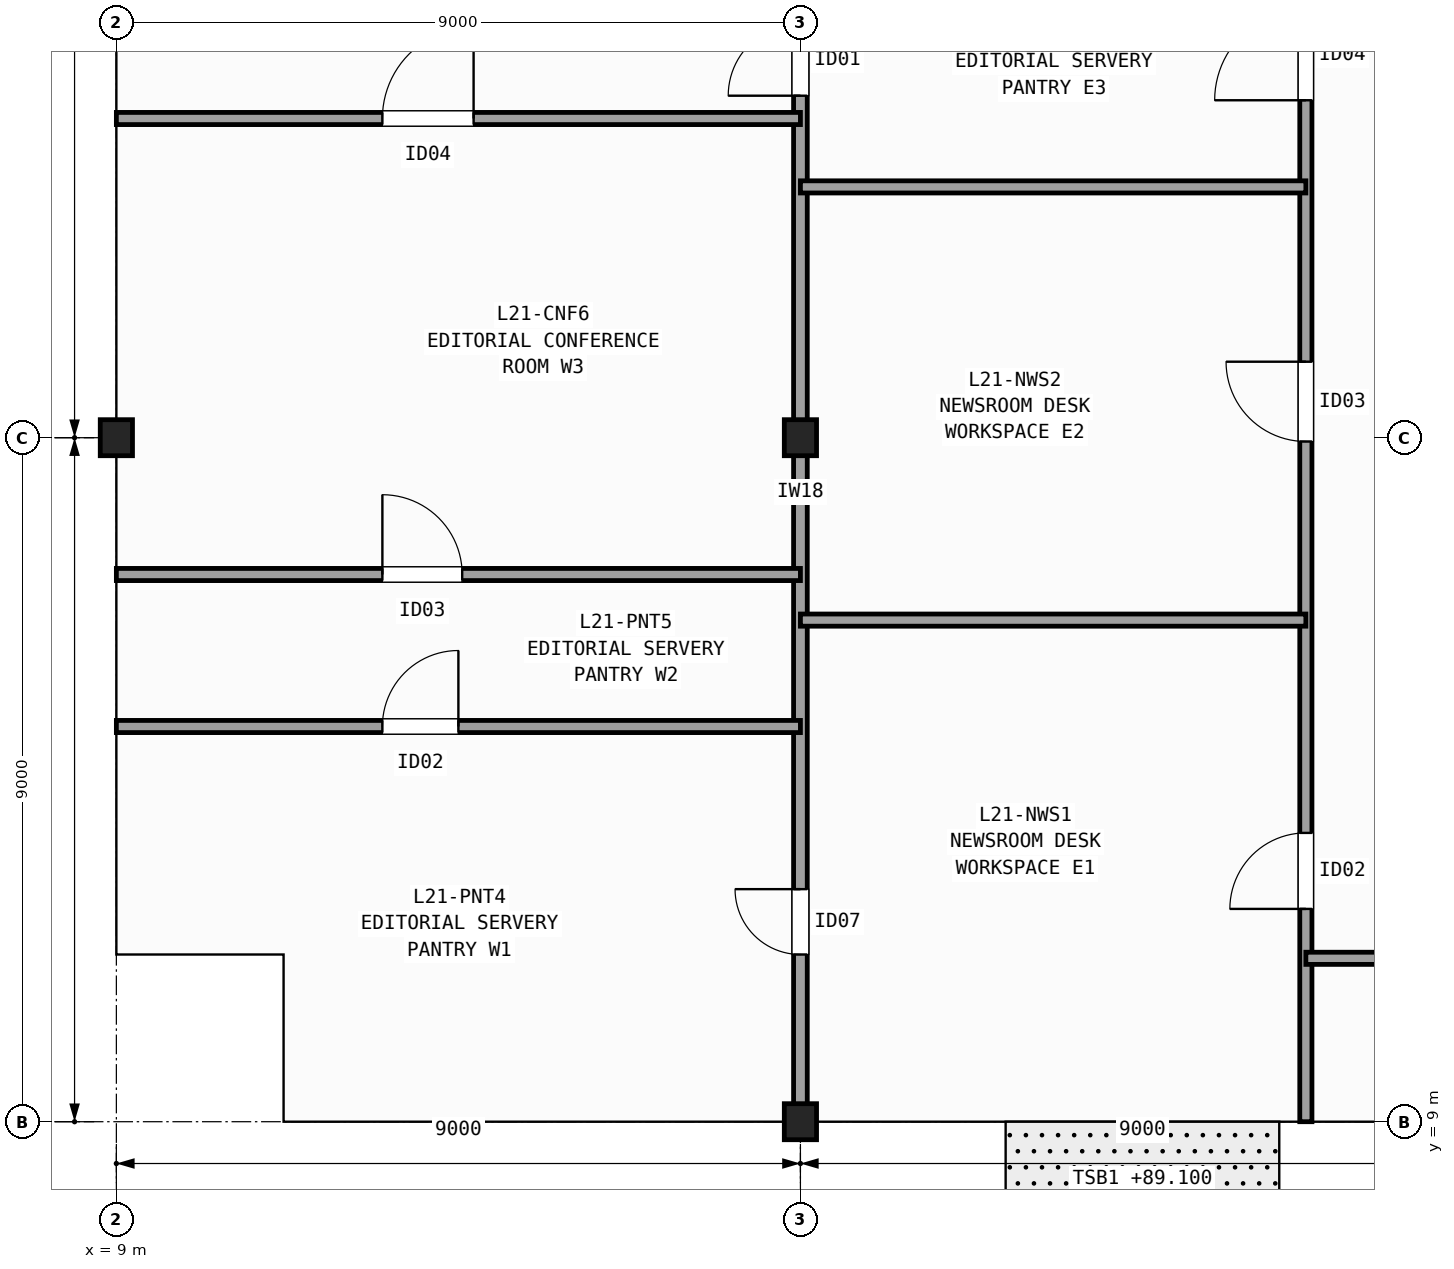
"""IFC4 building model, lengths in metres.
Left out: names, types, materials, properties, quantities, classifications, styles, units other than length and angle.
Written with IfcOpenShell. Run it as: python <this file> out.ifc"""

import sys

from ifc_helpers import new_model, si_unit, direction, frame, frame_2d, origin, origin_2d, place, context, subcontext, project, spatial, rectangle, i_section, extrude, element, fill, save


model = new_model("IFC4")
c1 = context("Model", 3, precision=1e-05, world=origin(), true_north=direction((0.0, 1.0)))
c2 = subcontext(c1, "Body", "Model", "MODEL_VIEW")
j1 = project(units=[si_unit("LENGTHUNIT", "METRE"), si_unit("PLANEANGLEUNIT", "RADIAN")], contexts=[c1])
p1 = place(None, origin())
s1 = spatial("IfcSite", under=j1, at=p1, CompositionType="ELEMENT")
p2 = place(p1, origin())
s2 = spatial("IfcBuilding", under=s1, at=p2, CompositionType="ELEMENT")
p3 = place(p2, frame((0.0, 0.0, 89.1)))
s3 = spatial("IfcBuildingStorey", under=s2, at=p3, CompositionType="ELEMENT", Elevation=89.1)
for number, where, z_axis, x_axis in (
    (1, (9.0, 18.0, 0.0), (0.0, 0.0, 1.0), (1.0, 0.0, 0.0)),
    (2, (18.0, 9.0, 0.0), (0.0, 0.0, 1.0), (1.0, 0.0, 0.0)),
    (3, (18.0, 18.0, 0.0), (0.0, 0.0, 1.0), (1.0, 0.0, 0.0)),
):
    element("IfcColumn", number, at=place(p3, frame(where, z_axis=z_axis, x_axis=x_axis)), inside=s3, PredefinedType="COLUMN", context=c2, shape_type="SweptSolid", body=[
        extrude(i_section(OverallWidth=0.424, OverallDepth=0.474, WebThickness=0.048, FlangeThickness=0.077, FilletRadius=0.015, at=origin_2d()), origin(), (0.0, 0.0, 1.0), 3.7),
    ])
p4 = place(p3, frame((24.65, 9.0, 0.0), z_axis=(0.0, 0.0, 1.0), x_axis=(0.0, 1.0, 0.0)))
e4 = element("IfcWall", 4, at=p4, inside=s3, PredefinedType="PARTITIONING", context=c2, shape_type="SweptSolid", body=[
    extrude(rectangle(XDim=19.2, YDim=0.16, at=frame_2d((9.6, 0.0))), origin(), (0.0, 0.0, 1.0), 2.627),
])
p5 = place(p4, frame((2.8, 0.0, 0.0)))
e5 = element("IfcOpeningElement", 5, at=p5, cuts=e4, PredefinedType="OPENING", context=c2, shape_type="SweptSolid", body=[
    extrude(rectangle(XDim=1.0, YDim=2.1, at=frame_2d((0.5, 1.05))), frame((0.0, 0.09, 0.0), z_axis=(0.0, -1.0, 0.0), x_axis=(1.0, 0.0, 0.0)), (0.0, 0.0, 1.0), 0.18),
])
p6 = place(p4, frame((8.95, 0.0, 0.0)))
e6 = element("IfcOpeningElement", 6, at=p6, cuts=e4, PredefinedType="OPENING", context=c2, shape_type="SweptSolid", body=[
    extrude(rectangle(XDim=1.05, YDim=2.15, at=frame_2d((0.525, 1.075))), frame((0.0, 0.09, 0.0), z_axis=(0.0, -1.0, 0.0), x_axis=(1.0, 0.0, 0.0)), (0.0, 0.0, 1.0), 0.18),
])
p7 = place(p4, frame((13.44, 0.0, 0.0)))
e7 = element("IfcOpeningElement", 7, at=p7, cuts=e4, PredefinedType="OPENING", context=c2, shape_type="SweptSolid", body=[
    extrude(rectangle(XDim=1.2, YDim=2.15, at=frame_2d((0.6, 1.075))), frame((0.0, 0.09, 0.0), z_axis=(0.0, -1.0, 0.0), x_axis=(1.0, 0.0, 0.0)), (0.0, 0.0, 1.0), 0.18),
])
p8 = place(p3, frame((18.0, 9.0, 0.0), z_axis=(0.0, 0.0, 1.0), x_axis=(0.0, 1.0, 0.0)))
e8 = element("IfcWall", 8, at=p8, inside=s3, PredefinedType="PARTITIONING", context=c2, shape_type="SweptSolid", body=[
    extrude(rectangle(XDim=15.58, YDim=0.18, at=frame_2d((7.79, 0.0))), origin(), (0.0, 0.0, 1.0), 2.627),
])
p9 = place(p8, frame((2.2, 0.0, 0.0)))
e9 = element("IfcOpeningElement", 9, at=p9, cuts=e8, PredefinedType="OPENING", context=c2, shape_type="SweptSolid", body=[
    extrude(rectangle(XDim=0.86, YDim=2.05, at=frame_2d((0.43, 1.025))), frame((0.0, 0.1, 0.0), z_axis=(0.0, -1.0, 0.0), x_axis=(1.0, 0.0, 0.0)), (0.0, 0.0, 1.0), 0.2),
])
p10 = place(p8, frame((13.5, 0.0, 0.0)))
e10 = element("IfcOpeningElement", 10, at=p10, cuts=e8, PredefinedType="OPENING", context=c2, shape_type="SweptSolid", body=[
    extrude(rectangle(XDim=0.95, YDim=2.1, at=frame_2d((0.475, 1.05))), frame((0.0, 0.1, 0.0), z_axis=(0.0, -1.0, 0.0), x_axis=(1.0, 0.0, 0.0)), (0.0, 0.0, 1.0), 0.2),
])
p11 = place(p3, frame((18.0, 15.6, 0.0), z_axis=(0.0, 0.0, 1.0), x_axis=(1.0, 0.0, 0.0)))
e11 = element("IfcWall", 11, at=p11, inside=s3, PredefinedType="PARTITIONING", context=c2, shape_type="SweptSolid", body=[
    extrude(rectangle(XDim=6.65, YDim=0.16, at=frame_2d((3.325, 0.0))), origin(), (0.0, 0.0, 1.0), 2.789),
])
p12 = place(p3, frame((18.0, 21.3, 0.0), z_axis=(0.0, 0.0, 1.0), x_axis=(1.0, 0.0, 0.0)))
e12 = element("IfcWall", 12, at=p12, inside=s3, PredefinedType="PARTITIONING", context=c2, shape_type="SweptSolid", body=[
    extrude(rectangle(XDim=6.65, YDim=0.16, at=frame_2d((3.325, 0.0))), origin(), (0.0, 0.0, 1.0), 2.792),
])
p13 = place(p3, frame((9.0, 14.2, 0.0), z_axis=(0.0, 0.0, 1.0), x_axis=(1.0, 0.0, 0.0)))
e13 = element("IfcWall", 13, at=p13, inside=s3, PredefinedType="PARTITIONING", context=c2, shape_type="SweptSolid", body=[
    extrude(rectangle(XDim=9.0, YDim=0.16, at=frame_2d((4.5, 0.0))), origin(), (0.0, 0.0, 1.0), 2.792),
])
p14 = place(p13, frame((3.5, 0.0, 0.0)))
e14 = element("IfcOpeningElement", 14, at=p14, cuts=e13, PredefinedType="OPENING", context=c2, shape_type="SweptSolid", body=[
    extrude(rectangle(XDim=1.0, YDim=2.1, at=frame_2d((0.5, 1.05))), frame((0.0, 0.09, 0.0), z_axis=(0.0, -1.0, 0.0), x_axis=(1.0, 0.0, 0.0)), (0.0, 0.0, 1.0), 0.18),
])
p15 = place(p3, frame((9.0, 16.2, 0.0), z_axis=(0.0, 0.0, 1.0), x_axis=(1.0, 0.0, 0.0)))
e15 = element("IfcWall", 15, at=p15, inside=s3, PredefinedType="PARTITIONING", context=c2, shape_type="SweptSolid", body=[
    extrude(rectangle(XDim=9.0, YDim=0.16, at=frame_2d((4.5, 0.0))), origin(), (0.0, 0.0, 1.0), 2.792),
])
p16 = place(p15, frame((3.5, 0.0, 0.0)))
e16 = element("IfcOpeningElement", 16, at=p16, cuts=e15, PredefinedType="OPENING", context=c2, shape_type="SweptSolid", body=[
    extrude(rectangle(XDim=1.05, YDim=2.15, at=frame_2d((0.525, 1.075))), frame((0.0, 0.09, 0.0), z_axis=(0.0, -1.0, 0.0), x_axis=(1.0, 0.0, 0.0)), (0.0, 0.0, 1.0), 0.18),
])
p17 = place(p3, frame((9.0, 22.2, 0.0), z_axis=(0.0, 0.0, 1.0), x_axis=(1.0, 0.0, 0.0)))
e17 = element("IfcWall", 17, at=p17, inside=s3, PredefinedType="PARTITIONING", context=c2, shape_type="SweptSolid", body=[
    extrude(rectangle(XDim=9.0, YDim=0.16, at=frame_2d((4.5, 0.0))), origin(), (0.0, 0.0, 1.0), 2.627),
])
p18 = place(p17, frame((3.5, 0.0, 0.0)))
e18 = element("IfcOpeningElement", 18, at=p18, cuts=e17, PredefinedType="OPENING", context=c2, shape_type="SweptSolid", body=[
    extrude(rectangle(XDim=1.2, YDim=2.15, at=frame_2d((0.6, 1.075))), frame((0.0, 0.09, 0.0), z_axis=(0.0, -1.0, 0.0), x_axis=(1.0, 0.0, 0.0)), (0.0, 0.0, 1.0), 0.18),
])
p19 = place(p3, frame((24.65, 11.15, 0.0), z_axis=(0.0, 0.0, 1.0), x_axis=(1.0, 0.0, 0.0)))
e19 = element("IfcWall", 19, at=p19, inside=s3, PredefinedType="PARTITIONING", context=c2, shape_type="SweptSolid", body=[
    extrude(rectangle(XDim=4.75, YDim=0.16, at=frame_2d((2.375, 0.0))), origin(), (0.0, 0.0, 1.0), 2.792),
])
p20 = place(p19, frame((1.2, 0.0, 0.0)))
e20 = element("IfcOpeningElement", 20, at=p20, cuts=e19, PredefinedType="OPENING", context=c2, shape_type="SweptSolid", body=[
    extrude(rectangle(XDim=1.05, YDim=2.15, at=frame_2d((0.525, 1.075))), frame((0.0, 0.09, 0.0), z_axis=(0.0, -1.0, 0.0), x_axis=(1.0, 0.0, 0.0)), (0.0, 0.0, 1.0), 0.18),
])
p21 = place(p5, origin())
e21 = element("IfcDoor", 21, at=p21, inside=s3, OperationType="SINGLE_SWING_LEFT", PredefinedType="DOOR", context=c2, shape_type="SweptSolid", body=[
    extrude(rectangle(XDim=1.0, YDim=2.1, at=frame_2d((0.5, 1.05))), frame((0.0, 0.025, 0.0), z_axis=(0.0, -1.0, 0.0), x_axis=(1.0, 0.0, 0.0)), (0.0, 0.0, 1.0), 0.05),
])
fill(e5, e21)
p22 = place(p6, origin())
e22 = element("IfcDoor", 22, at=p22, inside=s3, OperationType="SINGLE_SWING_RIGHT", PredefinedType="DOOR", context=c2, shape_type="SweptSolid", body=[
    extrude(rectangle(XDim=1.05, YDim=2.15, at=frame_2d((0.525, 1.075))), frame((0.0, 0.025, 0.0), z_axis=(0.0, -1.0, 0.0), x_axis=(1.0, 0.0, 0.0)), (0.0, 0.0, 1.0), 0.05),
])
fill(e6, e22)
p23 = place(p7, origin())
e23 = element("IfcDoor", 23, at=p23, inside=s3, OperationType="SINGLE_SWING_LEFT", PredefinedType="DOOR", context=c2, shape_type="SweptSolid", body=[
    extrude(rectangle(XDim=1.2, YDim=2.15, at=frame_2d((0.6, 1.075))), frame((0.0, 0.025, 0.0), z_axis=(0.0, -1.0, 0.0), x_axis=(1.0, 0.0, 0.0)), (0.0, 0.0, 1.0), 0.05),
])
fill(e7, e23)
p24 = place(p9, origin())
e24 = element("IfcDoor", 24, at=p24, inside=s3, OperationType="SINGLE_SWING_RIGHT", PredefinedType="DOOR", context=c2, shape_type="SweptSolid", body=[
    extrude(rectangle(XDim=0.86, YDim=2.05, at=frame_2d((0.43, 1.025))), frame((0.0, 0.025, 0.0), z_axis=(0.0, -1.0, 0.0), x_axis=(1.0, 0.0, 0.0)), (0.0, 0.0, 1.0), 0.05),
])
fill(e9, e24)
p25 = place(p10, origin())
e25 = element("IfcDoor", 25, at=p25, inside=s3, OperationType="SINGLE_SWING_LEFT", PredefinedType="DOOR", context=c2, shape_type="SweptSolid", body=[
    extrude(rectangle(XDim=0.95, YDim=2.1, at=frame_2d((0.475, 1.05))), frame((0.0, 0.025, 0.0), z_axis=(0.0, -1.0, 0.0), x_axis=(1.0, 0.0, 0.0)), (0.0, 0.0, 1.0), 0.05),
])
fill(e10, e25)
p26 = place(p14, origin())
e26 = element("IfcDoor", 26, at=p26, inside=s3, OperationType="SINGLE_SWING_RIGHT", PredefinedType="DOOR", context=c2, shape_type="SweptSolid", body=[
    extrude(rectangle(XDim=1.0, YDim=2.1, at=frame_2d((0.5, 1.05))), frame((0.0, 0.025, 0.0), z_axis=(0.0, -1.0, 0.0), x_axis=(1.0, 0.0, 0.0)), (0.0, 0.0, 1.0), 0.05),
])
fill(e14, e26)
p27 = place(p16, origin())
e27 = element("IfcDoor", 27, at=p27, inside=s3, OperationType="SINGLE_SWING_LEFT", PredefinedType="DOOR", context=c2, shape_type="SweptSolid", body=[
    extrude(rectangle(XDim=1.05, YDim=2.15, at=frame_2d((0.525, 1.075))), frame((0.0, 0.025, 0.0), z_axis=(0.0, -1.0, 0.0), x_axis=(1.0, 0.0, 0.0)), (0.0, 0.0, 1.0), 0.05),
])
fill(e16, e27)
p28 = place(p18, origin())
e28 = element("IfcDoor", 28, at=p28, inside=s3, OperationType="SINGLE_SWING_RIGHT", PredefinedType="DOOR", context=c2, shape_type="SweptSolid", body=[
    extrude(rectangle(XDim=1.2, YDim=2.15, at=frame_2d((0.6, 1.075))), frame((0.0, 0.025, 0.0), z_axis=(0.0, -1.0, 0.0), x_axis=(1.0, 0.0, 0.0)), (0.0, 0.0, 1.0), 0.05),
])
fill(e18, e28)
save(model, sys.argv[1])
